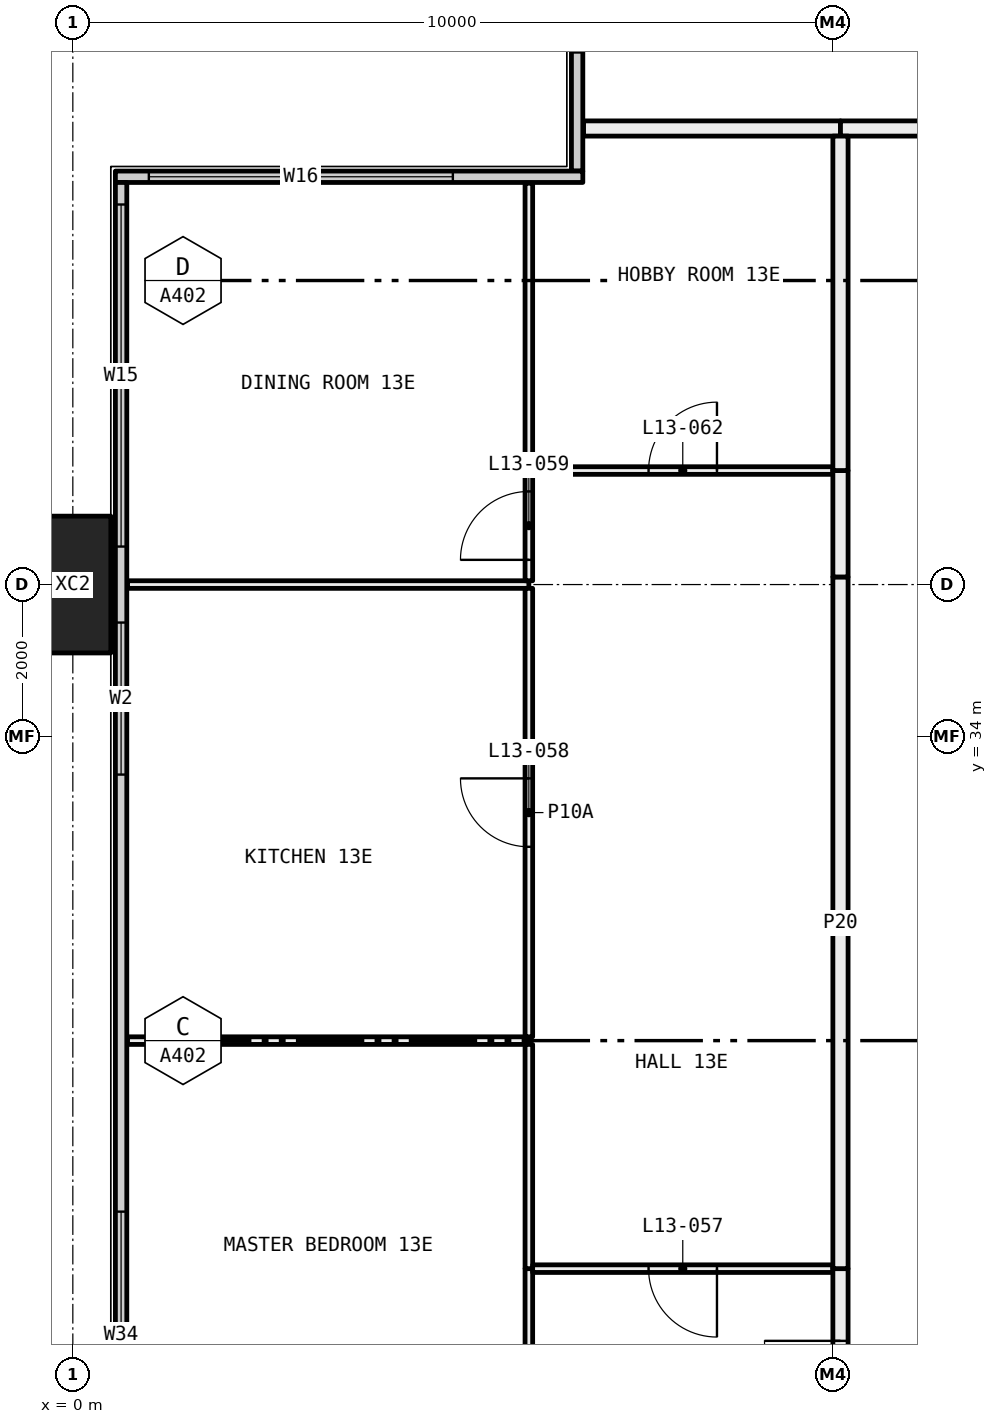
"""IFC4 building model, lengths in metres.
Left out: names, types, materials, properties, quantities, classifications, styles, units other than length and angle.
Written with IfcOpenShell. Run it as: python <this file> out.ifc"""

import sys

from ifc_helpers import new_model, si_unit, direction, frame, frame_2d, origin, origin_2d, place, context, subcontext, project, spatial, rectangle, hollow_rectangle, extrude, element, fill, save


model = new_model("IFC4")
c1 = context("Model", 3, precision=1e-05, world=origin(), true_north=direction((0.0, 1.0)))
c2 = subcontext(c1, "Body", "Model", "MODEL_VIEW")
j1 = project(units=[si_unit("LENGTHUNIT", "METRE"), si_unit("PLANEANGLEUNIT", "RADIAN")], contexts=[c1])
p1 = place(None, origin())
s1 = spatial("IfcSite", under=j1, at=p1, CompositionType="ELEMENT")
p2 = place(p1, origin())
s2 = spatial("IfcBuilding", under=s1, at=p2, CompositionType="ELEMENT")
p3 = place(p2, frame((0.0, 0.0, 57.6)))
s3 = spatial("IfcBuildingStorey", under=s2, at=p3, CompositionType="ELEMENT", Elevation=57.6)
p4 = place(p3, frame((0.0, 36.0, -0.4), z_axis=(0.0, 0.0, 1.0), x_axis=(0.0, 1.0, 0.0)))
e1 = element("IfcColumn", 1, at=p4, inside=s3, PredefinedType="COLUMN", context=c2, shape_type="SweptSolid", body=[
    extrude(hollow_rectangle(XDim=1.8, YDim=1.0, WallThickness=0.07, at=origin_2d()), origin(), (0.0, 0.0, 1.0), 3.45),
])
p5 = place(p3, frame((6.635, 41.44, 0.0), z_axis=(0.0, 0.0, 1.0), x_axis=(0.0, 1.0, 0.0)))
e2 = element("IfcWall", 2, at=p5, inside=s3, PredefinedType="ELEMENTEDWALL", context=c2, shape_type="SweptSolid", body=[
    extrude(rectangle(XDim=5.85, YDim=0.15, at=frame_2d((2.925, 0.0))), origin(), (0.0, 0.0, 1.0), 3.05),
])
p6 = place(p5, frame((1.56, 0.0, 0.45)))
e3 = element("IfcOpeningElement", 3, at=p6, cuts=e2, PredefinedType="OPENING", context=c2, shape_type="SweptSolid", body=[
    extrude(rectangle(XDim=4.0, YDim=2.55, at=frame_2d((2.0, 1.275))), frame((0.0, 0.085, 0.0), z_axis=(0.0, -1.0, 0.0), x_axis=(1.0, 0.0, 0.0)), (0.0, 0.0, 1.0), 0.17),
])
p7 = place(p3, frame((0.56, 41.365, 0.0), z_axis=(0.0, 0.0, 1.0), x_axis=(1.0, 0.0, 0.0)))
e4 = element("IfcWall", 4, at=p7, inside=s3, PredefinedType="ELEMENTEDWALL", context=c2, shape_type="SweptSolid", body=[
    extrude(rectangle(XDim=6.15, YDim=0.15, at=frame_2d((3.075, 0.0))), origin(), (0.0, 0.0, 1.0), 3.05),
])
p8 = place(p7, frame((0.44, 0.0, 0.45)))
e5 = element("IfcOpeningElement", 5, at=p8, cuts=e4, PredefinedType="OPENING", context=c2, shape_type="SweptSolid", body=[
    extrude(rectangle(XDim=4.0, YDim=2.55, at=frame_2d((2.0, 1.275))), frame((0.0, 0.085, 0.0), z_axis=(0.0, -1.0, 0.0), x_axis=(1.0, 0.0, 0.0)), (0.0, 0.0, 1.0), 0.17),
])
p9 = place(p3, frame((0.635, 6.71, 0.0), z_axis=(0.0, 0.0, 1.0), x_axis=(0.0, 1.0, 0.0)))
e6 = element("IfcWall", 6, at=p9, inside=s3, PredefinedType="ELEMENTEDWALL", context=c2, shape_type="SweptSolid", body=[
    extrude(rectangle(XDim=34.58, YDim=0.15, at=frame_2d((17.29, 0.0))), origin(), (0.0, 0.0, 1.0), 3.05),
])
p10 = place(p9, frame((0.29, 0.0, 0.45)))
e7 = element("IfcOpeningElement", 7, at=p10, cuts=e6, PredefinedType="OPENING", context=c2, shape_type="SweptSolid", body=[
    extrude(rectangle(XDim=4.5, YDim=2.55, at=frame_2d((2.25, 1.275))), frame((0.0, 0.085, 0.0), z_axis=(0.0, -1.0, 0.0), x_axis=(1.0, 0.0, 0.0)), (0.0, 0.0, 1.0), 0.17),
])
p11 = place(p9, frame((5.79, 0.0, 0.45)))
e8 = element("IfcOpeningElement", 8, at=p11, cuts=e6, PredefinedType="OPENING", context=c2, shape_type="SweptSolid", body=[
    extrude(rectangle(XDim=3.25, YDim=2.55, at=frame_2d((1.625, 1.275))), frame((0.0, 0.085, 0.0), z_axis=(0.0, -1.0, 0.0), x_axis=(1.0, 0.0, 0.0)), (0.0, 0.0, 1.0), 0.17),
])
p12 = place(p9, frame((13.54, 0.0, 0.45)))
e9 = element("IfcOpeningElement", 9, at=p12, cuts=e6, PredefinedType="OPENING", context=c2, shape_type="SweptSolid", body=[
    extrude(rectangle(XDim=3.25, YDim=2.55, at=frame_2d((1.625, 1.275))), frame((0.0, 0.085, 0.0), z_axis=(0.0, -1.0, 0.0), x_axis=(1.0, 0.0, 0.0)), (0.0, 0.0, 1.0), 0.17),
])
p13 = place(p9, frame((17.79, 0.0, 0.45)))
e10 = element("IfcOpeningElement", 10, at=p13, cuts=e6, PredefinedType="OPENING", context=c2, shape_type="SweptSolid", body=[
    extrude(rectangle(XDim=3.25, YDim=2.55, at=frame_2d((1.625, 1.275))), frame((0.0, 0.085, 0.0), z_axis=(0.0, -1.0, 0.0), x_axis=(1.0, 0.0, 0.0)), (0.0, 0.0, 1.0), 0.17),
])
p14 = place(p9, frame((26.79, 0.0, 0.45)))
e11 = element("IfcOpeningElement", 11, at=p14, cuts=e6, PredefinedType="OPENING", context=c2, shape_type="SweptSolid", body=[
    extrude(rectangle(XDim=2.0, YDim=2.55, at=frame_2d((1.0, 1.275))), frame((0.0, 0.085, 0.0), z_axis=(0.0, -1.0, 0.0), x_axis=(1.0, 0.0, 0.0)), (0.0, 0.0, 1.0), 0.17),
])
p15 = place(p9, frame((29.79, 0.0, 0.45)))
e12 = element("IfcOpeningElement", 12, at=p15, cuts=e6, PredefinedType="OPENING", context=c2, shape_type="SweptSolid", body=[
    extrude(rectangle(XDim=4.5, YDim=2.55, at=frame_2d((2.25, 1.275))), frame((0.0, 0.085, 0.0), z_axis=(0.0, -1.0, 0.0), x_axis=(1.0, 0.0, 0.0)), (0.0, 0.0, 1.0), 0.17),
])
p16 = place(p3, frame((6.72, 42.0, 0.0), z_axis=(0.0, 0.0, 1.0), x_axis=(1.0, 0.0, 0.0)))
e13 = element("IfcWall", 13, at=p16, inside=s3, PredefinedType="PARTITIONING", context=c2, shape_type="SweptSolid", body=[
    extrude(rectangle(XDim=3.38, YDim=0.2, at=frame_2d((1.69, 0.0))), origin(), (0.0, 0.0, 1.0), 3.05),
])
p17 = place(p3, frame((10.1, 42.0, 0.0), z_axis=(0.0, 0.0, 1.0), x_axis=(1.0, 0.0, 0.0)))
e14 = element("IfcWall", 14, at=p17, inside=s3, PredefinedType="PARTITIONING", context=c2, shape_type="SweptSolid", body=[
    extrude(rectangle(XDim=1.9, YDim=0.2, at=frame_2d((0.95, 0.0))), origin(), (0.0, 0.0, 1.0), 3.05),
])
p18 = place(p3, frame((6.0, 30.0, 0.0), z_axis=(0.0, 0.0, 1.0), x_axis=(-1.0, 0.0, 0.0)))
e15 = element("IfcWall", 15, at=p18, inside=s3, PredefinedType="PARTITIONING", context=c2, shape_type="SweptSolid", body=[
    extrude(rectangle(XDim=5.28, YDim=0.1, at=frame_2d((2.64, 0.0))), origin(), (0.0, 0.0, 1.0), 3.05),
])
p19 = place(p3, frame((6.0, 24.05, 0.0), z_axis=(0.0, 0.0, 1.0), x_axis=(0.0, 1.0, 0.0)))
e16 = element("IfcWall", 16, at=p19, inside=s3, PredefinedType="PARTITIONING", context=c2, shape_type="SweptSolid", body=[
    extrude(rectangle(XDim=2.95, YDim=0.1, at=frame_2d((1.475, 0.0))), origin(), (0.0, 0.0, 1.0), 2.45),
])
p20 = place(p3, frame((6.0, 27.0, 0.0), z_axis=(0.0, 0.0, 1.0), x_axis=(0.0, 1.0, 0.0)))
e17 = element("IfcWall", 17, at=p20, inside=s3, PredefinedType="PARTITIONING", context=c2, shape_type="SweptSolid", body=[
    extrude(rectangle(XDim=2.95, YDim=0.1, at=frame_2d((1.475, 0.0))), origin(), (0.0, 0.0, 1.0), 3.05),
])
p21 = place(p3, frame((6.0, 36.0, 0.0), z_axis=(0.0, 0.0, 1.0), x_axis=(-1.0, 0.0, 0.0)))
e18 = element("IfcWall", 18, at=p21, inside=s3, PredefinedType="PARTITIONING", context=c2, shape_type="SweptSolid", body=[
    extrude(rectangle(XDim=5.28, YDim=0.1, at=frame_2d((2.64, 0.0))), origin(), (0.0, 0.0, 1.0), 2.45),
])
p22 = place(p3, frame((6.0, 30.05, 0.0), z_axis=(0.0, 0.0, 1.0), x_axis=(0.0, 1.0, 0.0)))
e19 = element("IfcWall", 19, at=p22, inside=s3, PredefinedType="PARTITIONING", context=c2, shape_type="SweptSolid", body=[
    extrude(rectangle(XDim=5.9, YDim=0.1, at=frame_2d((2.95, 0.0))), origin(), (0.0, 0.0, 1.0), 2.45),
])
p23 = place(p22, frame((2.5, 0.0, 0.0)))
e20 = element("IfcOpeningElement", 20, at=p23, cuts=e19, PredefinedType="OPENING", context=c2, shape_type="SweptSolid", body=[
    extrude(rectangle(XDim=0.9, YDim=2.1, at=frame_2d((0.45, 1.05))), frame((0.0, 0.06, 0.0), z_axis=(0.0, -1.0, 0.0), x_axis=(1.0, 0.0, 0.0)), (0.0, 0.0, 1.0), 0.12),
])
p24 = place(p3, frame((6.0, 36.05, 0.0), z_axis=(0.0, 0.0, 1.0), x_axis=(0.0, 1.0, 0.0)))
e21 = element("IfcWall", 21, at=p24, inside=s3, PredefinedType="PARTITIONING", context=c2, shape_type="SweptSolid", body=[
    extrude(rectangle(XDim=1.45, YDim=0.1, at=frame_2d((0.725, 0.0))), origin(), (0.0, 0.0, 1.0), 2.45),
])
p25 = place(p24, frame((0.275, 0.0, 0.0)))
e22 = element("IfcOpeningElement", 22, at=p25, cuts=e21, PredefinedType="OPENING", context=c2, shape_type="SweptSolid", body=[
    extrude(rectangle(XDim=0.9, YDim=2.1, at=frame_2d((0.45, 1.05))), frame((0.0, 0.06, 0.0), z_axis=(0.0, -1.0, 0.0), x_axis=(1.0, 0.0, 0.0)), (0.0, 0.0, 1.0), 0.12),
])
p26 = place(p3, frame((6.0, 37.5, 0.0), z_axis=(0.0, 0.0, 1.0), x_axis=(0.0, 1.0, 0.0)))
e23 = element("IfcWall", 23, at=p26, inside=s3, PredefinedType="PARTITIONING", context=c2, shape_type="SweptSolid", body=[
    extrude(rectangle(XDim=3.78, YDim=0.1, at=frame_2d((1.89, 0.0))), origin(), (0.0, 0.0, 1.0), 3.05),
])
p27 = place(p3, frame((10.0, 27.0, 0.0), z_axis=(0.0, 0.0, 1.0), x_axis=(-1.0, 0.0, 0.0)))
e24 = element("IfcWall", 24, at=p27, inside=s3, PredefinedType="PARTITIONING", context=c2, shape_type="SweptSolid", body=[
    extrude(rectangle(XDim=3.95, YDim=0.1, at=frame_2d((1.975, 0.0))), origin(), (0.0, 0.0, 1.0), 3.05),
])
p28 = place(p27, frame((1.525, 0.0, 0.0)))
e25 = element("IfcOpeningElement", 25, at=p28, cuts=e24, PredefinedType="OPENING", context=c2, shape_type="SweptSolid", body=[
    extrude(rectangle(XDim=0.9, YDim=2.1, at=frame_2d((0.45, 1.05))), frame((0.0, 0.06, 0.0), z_axis=(0.0, -1.0, 0.0), x_axis=(1.0, 0.0, 0.0)), (0.0, 0.0, 1.0), 0.12),
])
p29 = place(p3, frame((10.1, 24.1, 0.0), z_axis=(0.0, 0.0, 1.0), x_axis=(0.0, 1.0, 0.0)))
e26 = element("IfcWall", 26, at=p29, inside=s3, PredefinedType="PARTITIONING", context=c2, shape_type="SweptSolid", body=[
    extrude(rectangle(XDim=2.9, YDim=0.2, at=frame_2d((1.45, 0.0))), origin(), (0.0, 0.0, 1.0), 3.05),
])
p30 = place(p29, frame((0.95, 0.0, 0.0)))
e27 = element("IfcOpeningElement", 27, at=p30, cuts=e26, PredefinedType="OPENING", context=c2, shape_type="SweptSolid", body=[
    extrude(rectangle(XDim=1.0, YDim=2.1, at=frame_2d((0.5, 1.05))), frame((0.0, 0.11, 0.0), z_axis=(0.0, -1.0, 0.0), x_axis=(1.0, 0.0, 0.0)), (0.0, 0.0, 1.0), 0.22),
])
p31 = place(p3, frame((10.0, 37.5, 0.0), z_axis=(0.0, 0.0, 1.0), x_axis=(-1.0, 0.0, 0.0)))
e28 = element("IfcWall", 28, at=p31, inside=s3, PredefinedType="PARTITIONING", context=c2, shape_type="SweptSolid", body=[
    extrude(rectangle(XDim=3.95, YDim=0.1, at=frame_2d((1.975, 0.0))), origin(), (0.0, 0.0, 1.0), 3.05),
])
p32 = place(p31, frame((1.525, 0.0, 0.0)))
e29 = element("IfcOpeningElement", 29, at=p32, cuts=e28, PredefinedType="OPENING", context=c2, shape_type="SweptSolid", body=[
    extrude(rectangle(XDim=0.9, YDim=2.1, at=frame_2d((0.45, 1.05))), frame((0.0, 0.06, 0.0), z_axis=(0.0, -1.0, 0.0), x_axis=(1.0, 0.0, 0.0)), (0.0, 0.0, 1.0), 0.12),
])
p33 = place(p3, frame((10.1, 27.0, 0.0), z_axis=(0.0, 0.0, 1.0), x_axis=(0.0, 1.0, 0.0)))
e30 = element("IfcWall", 30, at=p33, inside=s3, PredefinedType="PARTITIONING", context=c2, shape_type="SweptSolid", body=[
    extrude(rectangle(XDim=9.1, YDim=0.2, at=frame_2d((4.55, 0.0))), origin(), (0.0, 0.0, 1.0), 2.45),
])
p34 = place(p3, frame((10.1, 36.1, 0.0), z_axis=(0.0, 0.0, 1.0), x_axis=(0.0, 1.0, 0.0)))
e31 = element("IfcWall", 31, at=p34, inside=s3, PredefinedType="PARTITIONING", context=c2, shape_type="SweptSolid", body=[
    extrude(rectangle(XDim=1.4, YDim=0.2, at=frame_2d((0.7, 0.0))), origin(), (0.0, 0.0, 1.0), 3.05),
])
p35 = place(p3, frame((10.1, 37.5, 0.0), z_axis=(0.0, 0.0, 1.0), x_axis=(0.0, 1.0, 0.0)))
e32 = element("IfcWall", 32, at=p35, inside=s3, PredefinedType="PARTITIONING", context=c2, shape_type="SweptSolid", body=[
    extrude(rectangle(XDim=4.4, YDim=0.2, at=frame_2d((2.2, 0.0))), origin(), (0.0, 0.0, 1.0), 3.05),
])
p36 = place(p8, origin())
e33 = element("IfcWindow", 33, at=p36, inside=s3, PartitioningType="SINGLE_PANEL", PredefinedType="WINDOW", context=c2, shape_type="SweptSolid", body=[
    extrude(rectangle(XDim=4.0, YDim=2.55, at=frame_2d((2.0, 1.275))), frame((0.0, 0.03, 0.0), z_axis=(0.0, -1.0, 0.0), x_axis=(1.0, 0.0, 0.0)), (0.0, 0.0, 1.0), 0.06),
])
fill(e5, e33)
p37 = place(p13, origin())
e34 = element("IfcWindow", 34, at=p37, inside=s3, PartitioningType="SINGLE_PANEL", PredefinedType="WINDOW", context=c2, shape_type="SweptSolid", body=[
    extrude(rectangle(XDim=3.25, YDim=2.55, at=frame_2d((1.625, 1.275))), frame((0.0, 0.03, 0.0), z_axis=(0.0, -1.0, 0.0), x_axis=(1.0, 0.0, 0.0)), (0.0, 0.0, 1.0), 0.06),
])
fill(e10, e34)
p38 = place(p14, origin())
e35 = element("IfcWindow", 35, at=p38, inside=s3, PartitioningType="SINGLE_PANEL", PredefinedType="WINDOW", context=c2, shape_type="SweptSolid", body=[
    extrude(rectangle(XDim=2.0, YDim=2.55, at=frame_2d((1.0, 1.275))), frame((0.0, 0.03, 0.0), z_axis=(0.0, -1.0, 0.0), x_axis=(1.0, 0.0, 0.0)), (0.0, 0.0, 1.0), 0.06),
])
fill(e11, e35)
p39 = place(p15, origin())
e36 = element("IfcWindow", 36, at=p39, inside=s3, PartitioningType="SINGLE_PANEL", PredefinedType="WINDOW", context=c2, shape_type="SweptSolid", body=[
    extrude(rectangle(XDim=4.5, YDim=2.55, at=frame_2d((2.25, 1.275))), frame((0.0, 0.03, 0.0), z_axis=(0.0, -1.0, 0.0), x_axis=(1.0, 0.0, 0.0)), (0.0, 0.0, 1.0), 0.06),
])
fill(e12, e36)
p40 = place(p30, origin())
e37 = element("IfcDoor", 37, at=p40, inside=s3, OperationType="SINGLE_SWING_LEFT", PredefinedType="DOOR", context=c2, shape_type="SweptSolid", body=[
    extrude(rectangle(XDim=1.0, YDim=2.1, at=frame_2d((0.5, 1.05))), frame((0.0, 0.025, 0.0), z_axis=(0.0, -1.0, 0.0), x_axis=(1.0, 0.0, 0.0)), (0.0, 0.0, 1.0), 0.05),
])
fill(e27, e37)
p41 = place(p28, origin())
e38 = element("IfcDoor", 38, at=p41, inside=s3, OperationType="SINGLE_SWING_RIGHT", PredefinedType="DOOR", context=c2, shape_type="SweptSolid", body=[
    extrude(rectangle(XDim=0.9, YDim=2.1, at=frame_2d((0.45, 1.05))), frame((0.0, 0.025, 0.0), z_axis=(0.0, -1.0, 0.0), x_axis=(1.0, 0.0, 0.0)), (0.0, 0.0, 1.0), 0.05),
])
fill(e25, e38)
p42 = place(p23, origin())
e39 = element("IfcDoor", 39, at=p42, inside=s3, OperationType="SINGLE_SWING_LEFT", PredefinedType="DOOR", context=c2, shape_type="SweptSolid", body=[
    extrude(rectangle(XDim=0.9, YDim=2.1, at=frame_2d((0.45, 1.05))), frame((0.0, 0.025, 0.0), z_axis=(0.0, -1.0, 0.0), x_axis=(1.0, 0.0, 0.0)), (0.0, 0.0, 1.0), 0.05),
])
fill(e20, e39)
p43 = place(p25, origin())
e40 = element("IfcDoor", 40, at=p43, inside=s3, OperationType="SINGLE_SWING_RIGHT", PredefinedType="DOOR", context=c2, shape_type="SweptSolid", body=[
    extrude(rectangle(XDim=0.9, YDim=2.1, at=frame_2d((0.45, 1.05))), frame((0.0, 0.025, 0.0), z_axis=(0.0, -1.0, 0.0), x_axis=(1.0, 0.0, 0.0)), (0.0, 0.0, 1.0), 0.05),
])
fill(e22, e40)
p44 = place(p32, frame((0.9, 0.0, 0.0), x_axis=(-1.0, 0.0, 0.0)))
e41 = element("IfcDoor", 41, at=p44, inside=s3, OperationType="SINGLE_SWING_LEFT", PredefinedType="DOOR", context=c2, shape_type="SweptSolid", body=[
    extrude(rectangle(XDim=0.9, YDim=2.1, at=frame_2d((0.45, 1.05))), frame((0.0, 0.025, 0.0), z_axis=(0.0, -1.0, 0.0), x_axis=(1.0, 0.0, 0.0)), (0.0, 0.0, 1.0), 0.05),
])
fill(e29, e41)
save(model, sys.argv[1])
